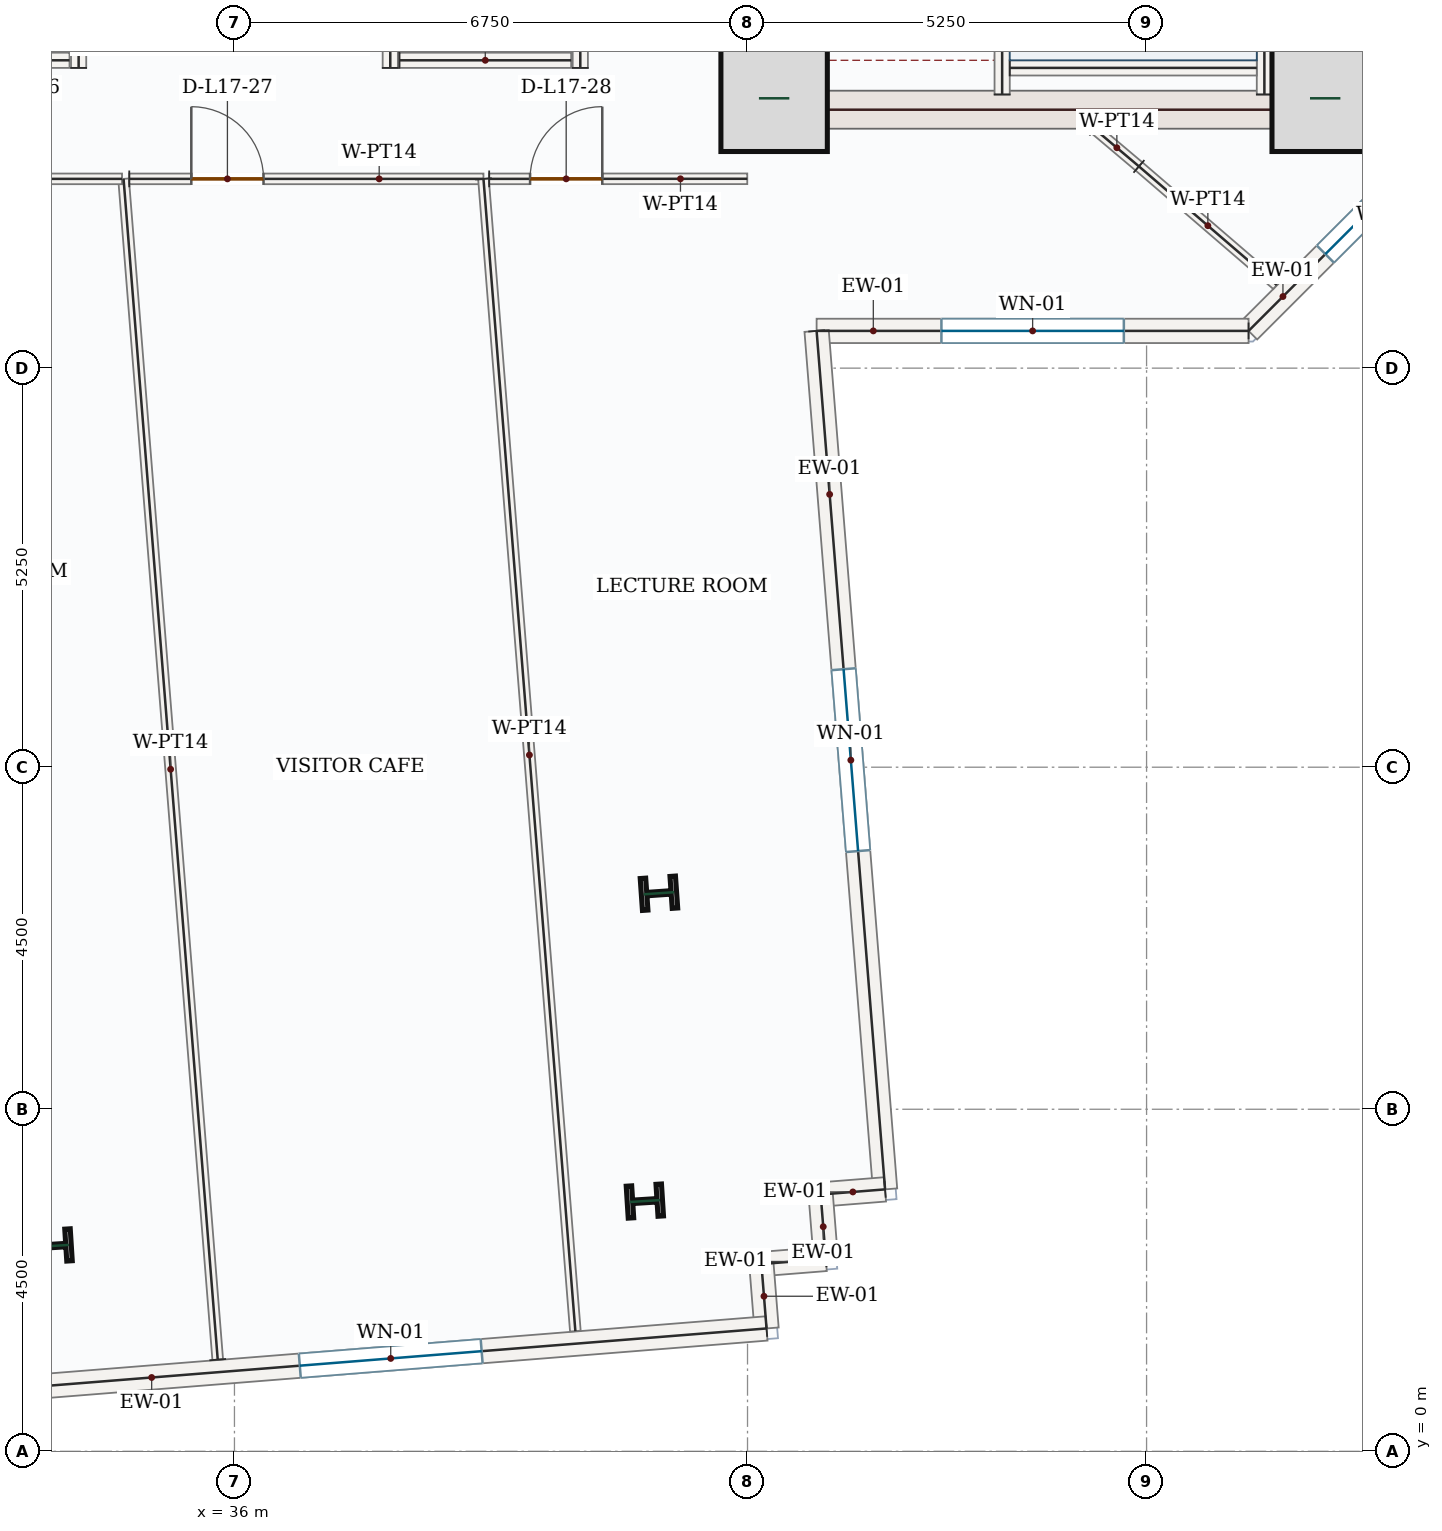
"""IFC4 building model, lengths in metres.
Left out: names, types, materials, properties, quantities, classifications, styles, units other than length and angle.
Written with IfcOpenShell. Run it as: python <this file> out.ifc"""

import sys

from ifc_helpers import new_model, si_unit, direction, frame, frame_2d, origin, origin_2d, place, context, subcontext, project, spatial, rectangle, i_section, extrude, source, transform, mapped, element, fill, save


model = new_model("IFC4")
c1 = context("Model", 3, precision=1e-05, world=origin(), true_north=direction((0.0, 1.0)))
c2 = subcontext(c1, "Body", "Model", "MODEL_VIEW")
j1 = project(units=[si_unit("LENGTHUNIT", "METRE"), si_unit("PLANEANGLEUNIT", "RADIAN")], contexts=[c1])
p1 = place(None, origin())
s1 = spatial("IfcSite", under=j1, at=p1, CompositionType="ELEMENT")
p2 = place(p1, origin())
s2 = spatial("IfcBuilding", under=s1, at=p2, CompositionType="ELEMENT")
p3 = place(p2, frame((0.0, 0.0, 79.5)))
s3 = spatial("IfcBuildingStorey", under=s2, at=p3, CompositionType="ELEMENT", Elevation=79.5)
p4 = place(p3, frame((43.0, 17.4, 0.0), z_axis=(0.0, 0.0, 1.0), x_axis=(0.0, 1.0, 0.0)))
e1 = element("IfcWall", 1, at=p4, inside=s3, PredefinedType="SHEAR", context=c2, shape_type="SweptSolid", body=[
    extrude(rectangle(XDim=8.55, YDim=0.5, at=frame_2d((4.275, 0.0))), origin(), (0.0, 0.0, 1.0), 3.95),
])
p5 = place(p4, frame((6.65, 0.0, 0.0)))
e2 = element("IfcOpeningElement", 2, at=p5, cuts=e1, PredefinedType="OPENING", context=c2, shape_type="SweptSolid", body=[
    extrude(rectangle(XDim=1.1, YDim=2.2, at=frame_2d((0.55, 1.1))), frame((0.0, 0.26, 0.0), z_axis=(0.0, -1.0, 0.0), x_axis=(1.0, 0.0, 0.0)), (0.0, 0.0, 1.0), 0.52),
])
p6 = place(p4, frame((1.75, 0.0, 0.0)))
e3 = element("IfcOpeningElement", 3, at=p6, cuts=e1, PredefinedType="OPENING", context=c2, shape_type="SweptSolid", body=[
    extrude(rectangle(XDim=1.3, YDim=2.2, at=frame_2d((0.65, 1.1))), frame((0.0, 0.26, 0.0), z_axis=(0.0, -1.0, 0.0), x_axis=(1.0, 0.0, 0.0)), (0.0, 0.0, 1.0), 0.52),
])
p7 = place(p4, frame((4.55, 0.0, 0.0)))
e4 = element("IfcOpeningElement", 4, at=p7, cuts=e1, PredefinedType="OPENING", context=c2, shape_type="SweptSolid", body=[
    extrude(rectangle(XDim=0.88, YDim=2.1, at=frame_2d((0.44, 1.05))), frame((0.0, 0.26, 0.0), z_axis=(0.0, -1.0, 0.0), x_axis=(1.0, 0.0, 0.0)), (0.0, 0.0, 1.0), 0.52),
])
m1 = source(origin(), c2, "Body", "SweptSolid", [
    extrude(rectangle(XDim=8.55, YDim=0.5, at=frame_2d((4.275, 0.0))), origin(), (0.0, 0.0, 1.0), 3.95),
])
p8 = place(p3, frame((50.5, 17.4, 0.0), z_axis=(0.0, 0.0, 1.0), x_axis=(0.0, 1.0, 0.0)))
e5 = element("IfcWall", 5, at=p8, inside=s3, PredefinedType="SHEAR", context=c2, shape_type="MappedRepresentation", body=[
    mapped(m1, transform((0.0, 0.0, 0.0), x_axis=(1.0, 0.0, 0.0), y_axis=(0.0, 1.0, 0.0), z_axis=(0.0, 0.0, 1.0), scale=1.0)),
])
m2 = source(origin(), c2, "Body", "SweptSolid", [
    extrude(rectangle(XDim=7.0, YDim=0.5, at=frame_2d((3.5, 0.0))), origin(), (0.0, 0.0, 1.0), 3.95),
])
p9 = place(p3, frame((43.25, 17.65, 0.0), z_axis=(0.0, 0.0, 1.0), x_axis=(1.0, 0.0, 0.0)))
e6 = element("IfcWall", 6, at=p9, inside=s3, PredefinedType="SHEAR", context=c2, shape_type="MappedRepresentation", body=[
    mapped(m2, transform((0.0, 0.0, 0.0), x_axis=(1.0, 0.0, 0.0), y_axis=(0.0, 1.0, 0.0), z_axis=(0.0, 0.0, 1.0), scale=1.0)),
])
m3 = source(origin(), c2, "Body", "SweptSolid", [
    extrude(rectangle(XDim=1.4, YDim=1.4, at=origin_2d()), origin(), (0.0, 0.0, 1.0), 4.2),
])
for number, where, z_axis, x_axis in (
    (7, (43.1, 17.8, 0.0), (0.0, 0.0, 1.0), (1.0, 0.0, 0.0)),
    (8, (50.35, 17.8, 0.0), (0.0, 0.0, 1.0), (1.0, 0.0, 0.0)),
):
    element("IfcColumn", number, at=place(p3, frame(where, z_axis=z_axis, x_axis=x_axis)), inside=s3, PredefinedType="COLUMN", context=c2, shape_type="MappedRepresentation", body=[
        mapped(m3, transform((0.0, 0.0, 0.0), x_axis=(1.0, 0.0, 0.0), y_axis=(0.0, 1.0, 0.0), z_axis=(0.0, 0.0, 1.0), scale=1.0)),
    ])
m4 = source(origin(), c2, "Body", "SweptSolid", [
    extrude(i_section(OverallWidth=0.421, OverallDepth=0.465, WebThickness=0.045, FlangeThickness=0.073, FilletRadius=0.018, at=origin_2d()), origin(), (0.0, 0.0, 1.0), 4.2),
])
for number, where, z_axis, x_axis in (
    (9, (41.585, 7.342, 0.0), (0.0, 0.0, 1.0), (-0.07, 0.998, 0.0)),
    (10, (33.621, 2.703, 0.0), (0.0, 0.0, 1.0), (-0.063, 0.998, 0.0)),
    (11, (41.399, 3.292, 0.0), (0.0, 0.0, 1.0), (-0.063, 0.998, 0.0)),
):
    element("IfcColumn", number, at=place(p3, frame(where, z_axis=z_axis, x_axis=x_axis)), inside=s3, PredefinedType="COLUMN", context=c2, shape_type="MappedRepresentation", body=[
        mapped(m4, transform((0.0, 0.0, 0.0), x_axis=(1.0, 0.0, 0.0), y_axis=(0.0, 1.0, 0.0), z_axis=(0.0, 0.0, 1.0), scale=1.0)),
    ])
p10 = place(p3, frame((53.06, 18.458, 0.0), z_axis=(0.0, 0.0, 1.0), x_axis=(-0.707106781187, -0.707106781187, 0.0)))
e12 = element("IfcWall", 12, at=p10, inside=s3, PredefinedType="SOLIDWALL", context=c2, shape_type="SweptSolid", body=[
    extrude(rectangle(XDim=5.258, YDim=0.32, at=frame_2d((2.629, 0.0))), origin(), (0.0, 0.0, 1.0), 3.95),
])
p11 = place(p10, frame((1.429, 0.0, 0.85)))
e13 = element("IfcOpeningElement", 13, at=p11, cuts=e12, PredefinedType="OPENING", context=c2, shape_type="SweptSolid", body=[
    extrude(rectangle(XDim=2.4, YDim=1.8, at=frame_2d((1.2, 0.9))), frame((0.0, 0.17, 0.0), z_axis=(0.0, -1.0, 0.0), x_axis=(1.0, 0.0, 0.0)), (0.0, 0.0, 1.0), 0.34),
])
p12 = place(p3, frame((49.342, 14.74, 0.0), z_axis=(0.0, 0.0, 1.0), x_axis=(-1.0, 0.0, 0.0)))
e14 = element("IfcWall", 14, at=p12, inside=s3, PredefinedType="SOLIDWALL", context=c2, shape_type="SweptSolid", body=[
    extrude(rectangle(XDim=5.683, YDim=0.32, at=frame_2d((2.842, 0.0))), origin(), (0.0, 0.0, 1.0), 3.95),
])
p13 = place(p12, frame((1.641, 0.0, 0.85)))
e15 = element("IfcOpeningElement", 15, at=p13, cuts=e14, PredefinedType="OPENING", context=c2, shape_type="SweptSolid", body=[
    extrude(rectangle(XDim=2.4, YDim=1.8, at=frame_2d((1.2, 0.9))), frame((0.0, 0.17, 0.0), z_axis=(0.0, -1.0, 0.0), x_axis=(1.0, 0.0, 0.0)), (0.0, 0.0, 1.0), 0.34),
])
p14 = place(p3, frame((43.659, 14.74, 0.0), z_axis=(0.0, 0.0, 1.0), x_axis=(0.079512268319, -0.996833887459, 0.0)))
e16 = element("IfcWall", 16, at=p14, inside=s3, PredefinedType="SOLIDWALL", context=c2, shape_type="SweptSolid", body=[
    extrude(rectangle(XDim=11.33, YDim=0.32, at=frame_2d((5.665, 0.0))), origin(), (0.0, 0.0, 1.0), 3.95),
])
p15 = place(p14, frame((4.465, 0.0, 0.85)))
e17 = element("IfcOpeningElement", 17, at=p15, cuts=e16, PredefinedType="OPENING", context=c2, shape_type="SweptSolid", body=[
    extrude(rectangle(XDim=2.4, YDim=1.8, at=frame_2d((1.2, 0.9))), frame((0.0, 0.17, 0.0), z_axis=(0.0, -1.0, 0.0), x_axis=(1.0, 0.0, 0.0)), (0.0, 0.0, 1.0), 0.34),
])
m5 = source(origin(), c2, "Body", "SweptSolid", [
    extrude(rectangle(XDim=0.85, YDim=0.32, at=frame_2d((0.425, 0.0))), origin(), (0.0, 0.0, 1.0), 3.95),
])
for number, where, z_axis, x_axis in (
    (18, (44.56, 3.446, 0.0), (0.0, 0.0, 1.0), (-0.997, -0.079, 0.0)),
    (19, (43.712, 3.378, 0.0), (0.0, 0.0, 1.0), (0.08, -0.997, 0.0)),
    (20, (43.78, 2.531, 0.0), (0.0, 0.0, 1.0), (-0.997, -0.08, 0.0)),
):
    element("IfcWall", number, at=place(p3, frame(where, z_axis=z_axis, x_axis=x_axis)), inside=s3, PredefinedType="SOLIDWALL", context=c2, shape_type="MappedRepresentation", body=[
        mapped(m5, transform((0.0, 0.0, 0.0), x_axis=(1.0, 0.0, 0.0), y_axis=(0.0, 1.0, 0.0), z_axis=(0.0, 0.0, 1.0), scale=1.0)),
    ])
m6 = source(origin(), c2, "Body", "SweptSolid", [
    extrude(rectangle(XDim=0.85, YDim=0.32, at=frame_2d((0.425, 0.0))), origin(), (0.0, 0.0, 1.0), 3.95),
])
p16 = place(p3, frame((42.933, 2.463, 0.0), z_axis=(0.0, 0.0, 1.0), x_axis=(0.079573954853, -0.996828965123, 0.0)))
e21 = element("IfcWall", 21, at=p16, inside=s3, PredefinedType="SOLIDWALL", context=c2, shape_type="MappedRepresentation", body=[
    mapped(m6, transform((0.0, 0.0, 0.0), x_axis=(1.0, 0.0, 0.0), y_axis=(0.0, 1.0, 0.0), z_axis=(0.0, 0.0, 1.0), scale=1.0)),
])
p17 = place(p3, frame((43.0, 1.616, 0.0), z_axis=(0.0, 0.0, 1.0), x_axis=(-0.996833485558, -0.079517306731, 0.0)))
e22 = element("IfcWall", 22, at=p17, inside=s3, PredefinedType="SOLIDWALL", context=c2, shape_type="SweptSolid", body=[
    extrude(rectangle(XDim=9.92, YDim=0.32, at=frame_2d((4.96, 0.0))), origin(), (0.0, 0.0, 1.0), 3.95),
])
p18 = place(p17, frame((3.76, 0.0, 0.85)))
e23 = element("IfcOpeningElement", 23, at=p18, cuts=e22, PredefinedType="OPENING", context=c2, shape_type="SweptSolid", body=[
    extrude(rectangle(XDim=2.4, YDim=1.8, at=frame_2d((1.2, 0.9))), frame((0.0, 0.17, 0.0), z_axis=(0.0, -1.0, 0.0), x_axis=(1.0, 0.0, 0.0)), (0.0, 0.0, 1.0), 0.34),
])
m7 = source(origin(), c2, "Body", "SweptSolid", [
    extrude(rectangle(XDim=7.87, YDim=0.2, at=frame_2d((3.935, 0.0))), origin(), (0.0, 0.0, 1.0), 3.95),
])
p19 = place(p3, frame((49.55, 17.85, 0.0), z_axis=(0.0, 0.0, 1.0), x_axis=(0.0, 1.0, 0.0)))
e24 = element("IfcWall", 24, at=p19, inside=s3, PredefinedType="SOLIDWALL", context=c2, shape_type="MappedRepresentation", body=[
    mapped(m7, transform((0.0, 0.0, 0.0), x_axis=(1.0, 0.0, 0.0), y_axis=(0.0, 1.0, 0.0), z_axis=(0.0, 0.0, 1.0), scale=1.0)),
])
p20 = place(p3, frame((46.1, 17.85, 0.0), z_axis=(0.0, 0.0, 1.0), x_axis=(0.0, 1.0, 0.0)))
e25 = element("IfcWall", 25, at=p20, inside=s3, PredefinedType="SOLIDWALL", context=c2, shape_type="SweptSolid", body=[
    extrude(rectangle(XDim=8.0, YDim=0.2, at=frame_2d((4.0, 0.0))), origin(), (0.0, 0.0, 1.0), 3.95),
])
p21 = place(p20, frame((6.3, 0.0, 0.0)))
e26 = element("IfcOpeningElement", 26, at=p21, cuts=e25, PredefinedType="OPENING", context=c2, shape_type="SweptSolid", body=[
    extrude(rectangle(XDim=1.05, YDim=2.15, at=frame_2d((0.525, 1.075))), frame((0.0, 0.11, 0.0), z_axis=(0.0, -1.0, 0.0), x_axis=(1.0, 0.0, 0.0)), (0.0, 0.0, 1.0), 0.22),
])
m8 = source(origin(), c2, "Body", "SweptSolid", [
    extrude(rectangle(XDim=3.25, YDim=0.2, at=frame_2d((1.625, 0.0))), origin(), (0.0, 0.0, 1.0), 3.95),
])
p22 = place(p3, frame((46.2, 18.2, 0.0), z_axis=(0.0, 0.0, 1.0), x_axis=(1.0, 0.0, 0.0)))
e27 = element("IfcWall", 27, at=p22, inside=s3, PredefinedType="SOLIDWALL", context=c2, shape_type="MappedRepresentation", body=[
    mapped(m8, transform((0.0, 0.0, 0.0), x_axis=(1.0, 0.0, 0.0), y_axis=(0.0, 1.0, 0.0), z_axis=(0.0, 0.0, 1.0), scale=1.0)),
])
m9 = source(origin(), c2, "Body", "SweptSolid", [
    extrude(rectangle(XDim=2.35, YDim=0.2, at=frame_2d((1.175, 0.0))), origin(), (0.0, 0.0, 1.0), 3.95),
])
p23 = place(p3, frame((33.95, 18.2, 0.0), z_axis=(0.0, 0.0, 1.0), x_axis=(0.0, 1.0, 0.0)))
e28 = element("IfcWall", 28, at=p23, inside=s3, PredefinedType="SOLIDWALL", context=c2, shape_type="MappedRepresentation", body=[
    mapped(m9, transform((0.0, 0.0, 0.0), x_axis=(1.0, 0.0, 0.0), y_axis=(0.0, 1.0, 0.0), z_axis=(0.0, 0.0, 1.0), scale=1.0)),
])
m10 = source(origin(), c2, "Body", "SweptSolid", [
    extrude(rectangle(XDim=2.26, YDim=0.2, at=frame_2d((1.13, 0.0))), origin(), (0.0, 0.0, 1.0), 3.95),
])
p24 = place(p3, frame((31.57, 18.3, 0.0), z_axis=(0.0, 0.0, 1.0), x_axis=(1.0, 0.0, 0.0)))
e29 = element("IfcWall", 29, at=p24, inside=s3, PredefinedType="SOLIDWALL", context=c2, shape_type="MappedRepresentation", body=[
    mapped(m10, transform((0.0, 0.0, 0.0), x_axis=(1.0, 0.0, 0.0), y_axis=(0.0, 1.0, 0.0), z_axis=(0.0, 0.0, 1.0), scale=1.0)),
])
for number, where, z_axis, x_axis in (
    (30, (38.05, 18.2, 0.0), (0.0, 0.0, 1.0), (0.0, 1.0, 0.0)),
    (31, (40.55, 18.2, 0.0), (0.0, 0.0, 1.0), (0.0, 1.0, 0.0)),
):
    element("IfcWall", number, at=place(p3, frame(where, z_axis=z_axis, x_axis=x_axis)), inside=s3, PredefinedType="SOLIDWALL", context=c2, shape_type="MappedRepresentation", body=[
        mapped(m9, transform((0.0, 0.0, 0.0), x_axis=(1.0, 0.0, 0.0), y_axis=(0.0, 1.0, 0.0), z_axis=(0.0, 0.0, 1.0), scale=1.0)),
    ])
p25 = place(p3, frame((38.17, 18.3, 0.0), z_axis=(0.0, 0.0, 1.0), x_axis=(1.0, 0.0, 0.0)))
e32 = element("IfcWall", 32, at=p25, inside=s3, PredefinedType="SOLIDWALL", context=c2, shape_type="MappedRepresentation", body=[
    mapped(m10, transform((0.0, 0.0, 0.0), x_axis=(1.0, 0.0, 0.0), y_axis=(0.0, 1.0, 0.0), z_axis=(0.0, 0.0, 1.0), scale=1.0)),
])
m11 = source(origin(), c2, "Body", "SweptSolid", [
    extrude(rectangle(XDim=15.583, YDim=0.14, at=frame_2d((7.792, 0.0))), origin(), (0.0, 0.0, 1.0), 3.95),
])
p26 = place(p3, frame((35.78, 1.206, 0.0), z_axis=(0.0, 0.0, 1.0), x_axis=(-0.079507979427, 0.996834229552, 0.0)))
e33 = element("IfcWall", 33, at=p26, inside=s3, PredefinedType="PARTITIONING", context=c2, shape_type="MappedRepresentation", body=[
    mapped(m11, transform((0.0, 0.0, 0.0), x_axis=(1.0, 0.0, 0.0), y_axis=(0.0, 1.0, 0.0), z_axis=(0.0, 0.0, 1.0), scale=1.0)),
])
p27 = place(p3, frame((34.616, 16.74, 0.0), z_axis=(0.0, 0.0, 1.0), x_axis=(1.0, 0.0, 0.0)))
e34 = element("IfcWall", 34, at=p27, inside=s3, PredefinedType="PARTITIONING", context=c2, shape_type="SweptSolid", body=[
    extrude(rectangle(XDim=4.66, YDim=0.14, at=frame_2d((2.33, 0.0))), origin(), (0.0, 0.0, 1.0), 3.95),
])
p28 = place(p27, frame((0.816, 0.0, 0.0)))
e35 = element("IfcOpeningElement", 35, at=p28, cuts=e34, PredefinedType="OPENING", context=c2, shape_type="SweptSolid", body=[
    extrude(rectangle(XDim=0.95, YDim=2.15, at=frame_2d((0.475, 1.075))), frame((0.0, 0.08, 0.0), z_axis=(0.0, -1.0, 0.0), x_axis=(1.0, 0.0, 0.0)), (0.0, 0.0, 1.0), 0.16),
])
m12 = source(origin(), c2, "Body", "SweptSolid", [
    extrude(rectangle(XDim=15.207, YDim=0.14, at=frame_2d((7.604, 0.0))), origin(), (0.0, 0.0, 1.0), 3.95),
])
p29 = place(p3, frame((39.276, 16.74, 0.0), z_axis=(0.0, 0.0, 1.0), x_axis=(0.07950146843, -0.996834748851, 0.0)))
e36 = element("IfcWall", 36, at=p29, inside=s3, PredefinedType="PARTITIONING", context=c2, shape_type="MappedRepresentation", body=[
    mapped(m12, transform((0.0, 0.0, 0.0), x_axis=(1.0, 0.0, 0.0), y_axis=(0.0, 1.0, 0.0), z_axis=(0.0, 0.0, 1.0), scale=1.0)),
])
p30 = place(p3, frame((39.351, 16.74, 0.0), z_axis=(0.0, 0.0, 1.0), x_axis=(0.999999935369, 0.000359531148, 0.0)))
e37 = element("IfcWall", 37, at=p30, inside=s3, PredefinedType="PARTITIONING", context=c2, shape_type="SweptSolid", body=[
    extrude(rectangle(XDim=3.395, YDim=0.14, at=frame_2d((1.698, 0.0))), origin(), (0.0, 0.0, 1.0), 3.95),
])
p31 = place(p30, frame((0.538, 0.0, 0.0)))
e38 = element("IfcOpeningElement", 38, at=p31, cuts=e37, PredefinedType="OPENING", context=c2, shape_type="SweptSolid", body=[
    extrude(rectangle(XDim=0.95, YDim=2.15, at=frame_2d((0.475, 1.075))), frame((0.0, 0.08, 0.0), z_axis=(0.0, -1.0, 0.0), x_axis=(1.0, 0.0, 0.0)), (0.0, 0.0, 1.0), 0.16),
])
m13 = source(origin(), c2, "Body", "SweptSolid", [
    extrude(rectangle(XDim=0.761, YDim=0.14, at=frame_2d((0.38, 0.0))), origin(), (0.0, 0.0, 1.0), 3.95),
])
p32 = place(p3, frame((47.318, 17.395, 0.0), z_axis=(0.0, 0.0, 1.0), x_axis=(0.764128340752, -0.645064243978, 0.0)))
e39 = element("IfcWall", 39, at=p32, inside=s3, PredefinedType="PARTITIONING", context=c2, shape_type="MappedRepresentation", body=[
    mapped(m13, transform((0.0, 0.0, 0.0), x_axis=(1.0, 0.0, 0.0), y_axis=(0.0, 1.0, 0.0), z_axis=(0.0, 0.0, 1.0), scale=1.0)),
])
m14 = source(origin(), c2, "Body", "SweptSolid", [
    extrude(rectangle(XDim=2.392, YDim=0.14, at=frame_2d((1.196, 0.0))), origin(), (0.0, 0.0, 1.0), 3.95),
])
p33 = place(p3, frame((47.9, 16.904, 0.0), z_axis=(0.0, 0.0, 1.0), x_axis=(0.758044905356, -0.652202362357, 0.0)))
e40 = element("IfcWall", 40, at=p33, inside=s3, PredefinedType="PARTITIONING", context=c2, shape_type="MappedRepresentation", body=[
    mapped(m14, transform((0.0, 0.0, 0.0), x_axis=(1.0, 0.0, 0.0), y_axis=(0.0, 1.0, 0.0), z_axis=(0.0, 0.0, 1.0), scale=1.0)),
])
p34 = place(p3, frame((29.258, 16.74, 0.0), z_axis=(0.0, 0.0, 1.0), x_axis=(0.999999998924, -4.6384341e-05, 0.0)))
e41 = element("IfcWall", 41, at=p34, inside=s3, PredefinedType="PARTITIONING", context=c2, shape_type="SweptSolid", body=[
    extrude(rectangle(XDim=5.263, YDim=0.14, at=frame_2d((2.632, 0.0))), origin(), (0.0, 0.0, 1.0), 3.95),
])
p35 = place(p34, frame((3.365, 0.0, 0.0)))
e42 = element("IfcOpeningElement", 42, at=p35, cuts=e41, PredefinedType="OPENING", context=c2, shape_type="SweptSolid", body=[
    extrude(rectangle(XDim=0.95, YDim=2.15, at=frame_2d((0.475, 1.075))), frame((0.0, 0.08, 0.0), z_axis=(0.0, -1.0, 0.0), x_axis=(1.0, 0.0, 0.0)), (0.0, 0.0, 1.0), 0.16),
])
m15 = source(origin(), c2, "Body", "SweptSolid", [
    extrude(rectangle(XDim=2.4, YDim=1.8, at=frame_2d((1.2, 0.9))), frame((0.0, 0.03, 0.0), z_axis=(0.0, -1.0, 0.0), x_axis=(1.0, 0.0, 0.0)), (0.0, 0.0, 1.0), 0.06),
])
p36 = place(p11, origin())
e43 = element("IfcWindow", 43, at=p36, inside=s3, PartitioningType="DOUBLE_PANEL_VERTICAL", PredefinedType="WINDOW", context=c2, shape_type="MappedRepresentation", body=[
    mapped(m15, transform((0.0, 0.0, 0.0), x_axis=(1.0, 0.0, 0.0), y_axis=(0.0, 1.0, 0.0), z_axis=(0.0, 0.0, 1.0), scale=1.0)),
])
fill(e13, e43)
p37 = place(p13, origin())
e44 = element("IfcWindow", 44, at=p37, inside=s3, PartitioningType="DOUBLE_PANEL_VERTICAL", PredefinedType="WINDOW", context=c2, shape_type="MappedRepresentation", body=[
    mapped(m15, transform((0.0, 0.0, 0.0), x_axis=(1.0, 0.0, 0.0), y_axis=(0.0, 1.0, 0.0), z_axis=(0.0, 0.0, 1.0), scale=1.0)),
])
fill(e15, e44)
p38 = place(p15, origin())
e45 = element("IfcWindow", 45, at=p38, inside=s3, PartitioningType="DOUBLE_PANEL_VERTICAL", PredefinedType="WINDOW", context=c2, shape_type="MappedRepresentation", body=[
    mapped(m15, transform((0.0, 0.0, 0.0), x_axis=(1.0, 0.0, 0.0), y_axis=(0.0, 1.0, 0.0), z_axis=(0.0, 0.0, 1.0), scale=1.0)),
])
fill(e17, e45)
p39 = place(p18, origin())
e46 = element("IfcWindow", 46, at=p39, inside=s3, PartitioningType="DOUBLE_PANEL_VERTICAL", PredefinedType="WINDOW", context=c2, shape_type="MappedRepresentation", body=[
    mapped(m15, transform((0.0, 0.0, 0.0), x_axis=(1.0, 0.0, 0.0), y_axis=(0.0, 1.0, 0.0), z_axis=(0.0, 0.0, 1.0), scale=1.0)),
])
fill(e23, e46)
m16 = source(origin(), c2, "Body", "SweptSolid", [
    extrude(rectangle(XDim=0.95, YDim=2.15, at=frame_2d((0.475, 1.075))), frame((0.0, 0.025, 0.0), z_axis=(0.0, -1.0, 0.0), x_axis=(1.0, 0.0, 0.0)), (0.0, 0.0, 1.0), 0.05),
])
p40 = place(p28, origin())
e47 = element("IfcDoor", 47, at=p40, inside=s3, OperationType="SINGLE_SWING_LEFT", PredefinedType="DOOR", context=c2, shape_type="MappedRepresentation", body=[
    mapped(m16, transform((0.0, 0.0, 0.0), x_axis=(1.0, 0.0, 0.0), y_axis=(0.0, 1.0, 0.0), z_axis=(0.0, 0.0, 1.0), scale=1.0)),
])
fill(e35, e47)
p41 = place(p31, origin())
e48 = element("IfcDoor", 48, at=p41, inside=s3, OperationType="SINGLE_SWING_RIGHT", PredefinedType="DOOR", context=c2, shape_type="MappedRepresentation", body=[
    mapped(m16, transform((0.0, 0.0, 0.0), x_axis=(1.0, 0.0, 0.0), y_axis=(0.0, 1.0, 0.0), z_axis=(0.0, 0.0, 1.0), scale=1.0)),
])
fill(e38, e48)
save(model, sys.argv[1])
